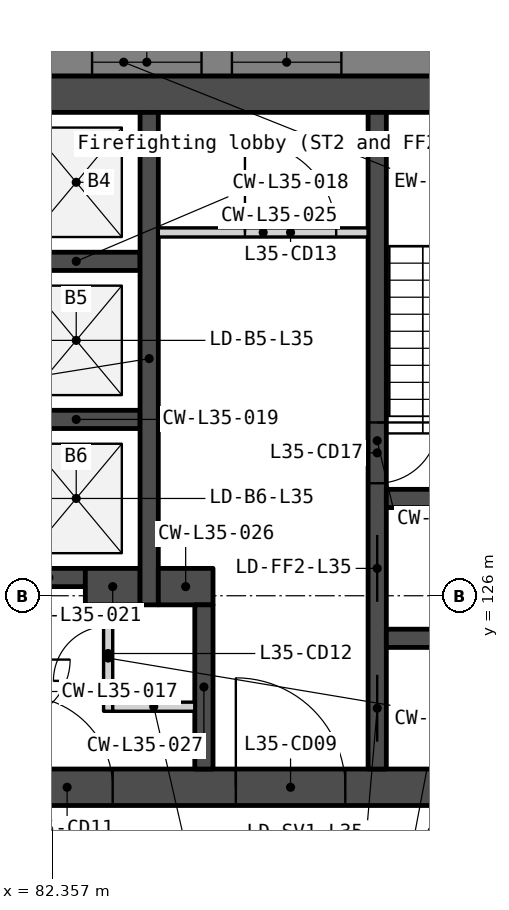
"""IFC4 building model, lengths in metres.
Left out: names, types, materials, properties, quantities, classifications, styles, units other than length and angle.
Written with IfcOpenShell. Run it as: python <this file> out.ifc"""

import sys

from ifc_helpers import new_model, si_unit, direction, frame, frame_2d, origin, place, context, subcontext, project, spatial, polyline, rectangle, outline, extrude, element, fill, save


model = new_model("IFC4")
c1 = context("Model", 3, precision=1e-05, world=origin(), true_north=direction((0.0, 1.0)))
c2 = subcontext(c1, "Body", "Model", "MODEL_VIEW")
j1 = project(units=[si_unit("LENGTHUNIT", "METRE"), si_unit("PLANEANGLEUNIT", "RADIAN")], contexts=[c1])
p1 = place(None, origin())
s1 = spatial("IfcSite", under=j1, at=p1, CompositionType="ELEMENT")
p2 = place(p1, origin())
s2 = spatial("IfcBuilding", under=s1, at=p2, CompositionType="ELEMENT")
p3 = place(p2, frame((0.0, 0.0, 140.3)))
s3 = spatial("IfcBuildingStorey", under=s2, at=p3, CompositionType="ELEMENT", Elevation=140.3)
p4 = place(p3, frame((69.0, 134.25, 0.0), z_axis=(0.0, 0.0, 1.0), x_axis=(1.0, 0.0, 0.0)))
e1 = element("IfcWall", 1, at=p4, inside=s3, PredefinedType="SOLIDWALL", context=c2, shape_type="SweptSolid", body=[
    extrude(rectangle(XDim=22.0, YDim=0.6, at=frame_2d((11.0, 0.0))), origin(), (0.0, 0.0, 1.0), 3.75),
])
p5 = place(p3, frame((69.0, 122.85, 0.0), z_axis=(0.0, 0.0, 1.0), x_axis=(1.0, 0.0, 0.0)))
e2 = element("IfcWall", 2, at=p5, inside=s3, PredefinedType="SOLIDWALL", context=c2, shape_type="SweptSolid", body=[
    extrude(rectangle(XDim=22.0, YDim=0.6, at=frame_2d((11.0, 0.0))), origin(), (0.0, 0.0, 1.0), 3.75),
])
p6 = place(p5, frame((16.375, 0.0, 0.0)))
e3 = element("IfcOpeningElement", 3, at=p6, cuts=e2, PredefinedType="OPENING", context=c2, shape_type="SweptSolid", body=[
    extrude(rectangle(XDim=1.8, YDim=2.1, at=frame_2d((0.9, 1.05))), frame((0.0, 0.31, 0.0), z_axis=(0.0, -1.0, 0.0), x_axis=(1.0, 0.0, 0.0)), (0.0, 0.0, 1.0), 0.62),
])
p7 = place(p5, frame((3.825, 0.0, 0.0)))
e4 = element("IfcOpeningElement", 4, at=p7, cuts=e2, PredefinedType="OPENING", context=c2, shape_type="SweptSolid", body=[
    extrude(rectangle(XDim=1.8, YDim=2.1, at=frame_2d((0.9, 1.05))), frame((0.0, 0.31, 0.0), z_axis=(0.0, -1.0, 0.0), x_axis=(1.0, 0.0, 0.0)), (0.0, 0.0, 1.0), 0.62),
])
p8 = place(p5, frame((12.85, 0.0, 0.0)))
e5 = element("IfcOpeningElement", 5, at=p8, cuts=e2, PredefinedType="OPENING", context=c2, shape_type="SweptSolid", body=[
    extrude(rectangle(XDim=1.5, YDim=2.1, at=frame_2d((0.75, 1.05))), frame((0.0, 0.31, 0.0), z_axis=(0.0, -1.0, 0.0), x_axis=(1.0, 0.0, 0.0)), (0.0, 0.0, 1.0), 0.62),
])
for number, where, z_axis, x_axis in (
    (6, (81.7, 131.5, 0.0), (0.0, 0.0, 1.0), (1.0, 0.0, 0.0)),
    (7, (81.7, 128.9, 0.0), (0.0, 0.0, 1.0), (1.0, 0.0, 0.0)),
):
    element("IfcWall", number, at=place(p3, frame(where, z_axis=z_axis, x_axis=x_axis)), inside=s3, PredefinedType="SOLIDWALL", context=c2, shape_type="SweptSolid", body=[
        extrude(rectangle(XDim=2.1, YDim=0.3, at=frame_2d((1.05, 0.0))), origin(), (0.0, 0.0, 1.0), 3.75),
    ])
p9 = place(p3, frame((81.7, 126.3, 0.0), z_axis=(0.0, 0.0, 1.0), x_axis=(1.0, 0.0, 0.0)))
e8 = element("IfcWall", 8, at=p9, inside=s3, PredefinedType="SOLIDWALL", context=c2, shape_type="SweptSolid", body=[
    extrude(rectangle(XDim=1.2, YDim=0.3, at=frame_2d((0.6, 0.0))), origin(), (0.0, 0.0, 1.0), 3.75),
])
p10 = place(p3, frame((82.9, 126.15, 0.0), z_axis=(0.0, 0.0, 1.0), x_axis=(1.0, 0.0, 0.0)))
e9 = element("IfcWall", 9, at=p10, inside=s3, PredefinedType="SOLIDWALL", context=c2, shape_type="SweptSolid", body=[
    extrude(rectangle(XDim=0.9, YDim=0.6, at=frame_2d((0.45, 0.0))), origin(), (0.0, 0.0, 1.0), 3.75),
])
p11 = place(p3, frame((83.275, 125.85, 0.0), z_axis=(0.0, 0.0, 1.0), x_axis=(0.0, -1.0, 0.0)))
e10 = element("IfcWall", 10, at=p11, inside=s3, PredefinedType="PARTITIONING", context=c2, shape_type="SweptSolid", body=[
    extrude(rectangle(XDim=1.75, YDim=0.15, at=frame_2d((0.875, 0.0))), origin(), (0.0, 0.0, 1.0), 3.75),
])
p12 = place(p11, frame((0.35, 0.0, 0.0)))
e11 = element("IfcOpeningElement", 11, at=p12, cuts=e10, PredefinedType="OPENING", context=c2, shape_type="SweptSolid", body=[
    extrude(rectangle(XDim=0.9, YDim=2.1, at=frame_2d((0.45, 1.05))), frame((0.0, 0.085, 0.0), z_axis=(0.0, -1.0, 0.0), x_axis=(1.0, 0.0, 0.0)), (0.0, 0.0, 1.0), 0.17),
])
p13 = place(p3, frame((83.35, 124.175, 0.0), z_axis=(0.0, 0.0, 1.0), x_axis=(1.0, 0.0, 0.0)))
e12 = element("IfcWall", 12, at=p13, inside=s3, PredefinedType="PARTITIONING", context=c2, shape_type="SweptSolid", body=[
    extrude(rectangle(XDim=1.35, YDim=0.15, at=frame_2d((0.675, 0.0))), origin(), (0.0, 0.0, 1.0), 3.75),
])
p14 = place(p3, frame((83.95, 133.95, 0.0), z_axis=(0.0, 0.0, 1.0), x_axis=(0.0, -1.0, 0.0)))
e13 = element("IfcWall", 13, at=p14, inside=s3, PredefinedType="SOLIDWALL", context=c2, shape_type="SweptSolid", body=[
    extrude(rectangle(XDim=8.1, YDim=0.3, at=frame_2d((4.05, 0.0))), origin(), (0.0, 0.0, 1.0), 3.75),
])
p15 = place(p3, frame((84.1, 131.975, 0.0), z_axis=(0.0, 0.0, 1.0), x_axis=(1.0, 0.0, 0.0)))
e14 = element("IfcWall", 14, at=p15, inside=s3, PredefinedType="PARTITIONING", context=c2, shape_type="SweptSolid", body=[
    extrude(rectangle(XDim=3.45, YDim=0.15, at=frame_2d((1.725, 0.0))), origin(), (0.0, 0.0, 1.0), 3.75),
])
p16 = place(p15, frame((1.425, 0.0, 0.0)))
e15 = element("IfcOpeningElement", 15, at=p16, cuts=e14, PredefinedType="OPENING", context=c2, shape_type="SweptSolid", body=[
    extrude(rectangle(XDim=1.5, YDim=2.1, at=frame_2d((0.75, 1.05))), frame((0.0, 0.085, 0.0), z_axis=(0.0, -1.0, 0.0), x_axis=(1.0, 0.0, 0.0)), (0.0, 0.0, 1.0), 0.17),
])
p17 = place(p3, frame((84.1, 126.15, 0.0), z_axis=(0.0, 0.0, 1.0), x_axis=(1.0, 0.0, 0.0)))
e16 = element("IfcWall", 16, at=p17, inside=s3, PredefinedType="SOLIDWALL", context=c2, shape_type="SweptSolid", body=[
    extrude(rectangle(XDim=0.9, YDim=0.6, at=frame_2d((0.45, 0.0))), origin(), (0.0, 0.0, 1.0), 3.75),
])
p18 = place(p3, frame((84.85, 125.85, 0.0), z_axis=(0.0, 0.0, 1.0), x_axis=(0.0, -1.0, 0.0)))
e17 = element("IfcWall", 17, at=p18, inside=s3, PredefinedType="SOLIDWALL", context=c2, shape_type="SweptSolid", body=[
    extrude(rectangle(XDim=2.7, YDim=0.3, at=frame_2d((1.35, 0.0))), origin(), (0.0, 0.0, 1.0), 3.75),
])
p19 = place(p3, frame((87.7, 133.95, 0.0), z_axis=(0.0, 0.0, 1.0), x_axis=(0.0, -1.0, 0.0)))
e18 = element("IfcWall", 18, at=p19, inside=s3, PredefinedType="SOLIDWALL", context=c2, shape_type="SweptSolid", body=[
    extrude(rectangle(XDim=10.8, YDim=0.3, at=frame_2d((5.4, 0.0))), origin(), (0.0, 0.0, 1.0), 3.75),
])
p20 = place(p19, frame((6.95, 0.0, 0.0)))
e19 = element("IfcOpeningElement", 19, at=p20, cuts=e18, PredefinedType="OPENING", context=c2, shape_type="SweptSolid", body=[
    extrude(rectangle(XDim=1.1, YDim=2.1, at=frame_2d((0.55, 1.05))), frame((0.0, 0.16, 0.0), z_axis=(0.0, -1.0, 0.0), x_axis=(1.0, 0.0, 0.0)), (0.0, 0.0, 1.0), 0.32),
])
p21 = place(p19, frame((5.1, 0.0, 0.0)))
e20 = element("IfcOpeningElement", 20, at=p21, cuts=e18, PredefinedType="OPENING", context=c2, shape_type="SweptSolid", body=[
    extrude(rectangle(XDim=1.0, YDim=2.1, at=frame_2d((0.5, 1.05))), frame((0.0, 0.16, 0.0), z_axis=(0.0, -1.0, 0.0), x_axis=(1.0, 0.0, 0.0)), (0.0, 0.0, 1.0), 0.32),
])
p22 = place(p19, frame((9.25, 0.0, 0.0)))
e21 = element("IfcOpeningElement", 21, at=p22, cuts=e18, PredefinedType="OPENING", context=c2, shape_type="SweptSolid", body=[
    extrude(rectangle(XDim=1.1, YDim=2.1, at=frame_2d((0.55, 1.05))), frame((0.0, 0.16, 0.0), z_axis=(0.0, -1.0, 0.0), x_axis=(1.0, 0.0, 0.0)), (0.0, 0.0, 1.0), 0.32),
])
for number, where, z_axis, x_axis in (
    (22, (87.85, 127.6, 0.0), (0.0, 0.0, 1.0), (1.0, 0.0, 0.0)),
    (23, (87.85, 125.3, 0.0), (0.0, 0.0, 1.0), (1.0, 0.0, 0.0)),
):
    element("IfcWall", number, at=place(p3, frame(where, z_axis=z_axis, x_axis=x_axis)), inside=s3, PredefinedType="SOLIDWALL", context=c2, shape_type="SweptSolid", body=[
        extrude(rectangle(XDim=2.55, YDim=0.3, at=frame_2d((1.275, 0.0))), origin(), (0.0, 0.0, 1.0), 3.75),
    ])
p23 = place(p3, frame((100.243, 134.775, -0.15), z_axis=(0.0, 0.0, 1.0), x_axis=(-1.0, 0.0, 0.0)))
e24 = element("IfcWall", 24, at=p23, inside=s3, PredefinedType="SOLIDWALL", context=c2, shape_type="SweptSolid", body=[
    extrude(outline(polyline([(0.0, 0.0), (0.0, 3.9), (33.425, 3.9), (33.425, 0.0), (0.0, 0.0)])), frame((0.0, 0.225, 0.0), z_axis=(0.0, -1.0, 0.0), x_axis=(1.0, 0.0, 0.0)), (0.0, 0.0, 1.0), 0.45),
])
p24 = place(p23, frame((3.011, 0.0, 0.95)))
e25 = element("IfcOpeningElement", 25, at=p24, cuts=e24, PredefinedType="OPENING", context=c2, shape_type="SweptSolid", body=[
    extrude(rectangle(XDim=1.8, YDim=2.2, at=frame_2d((0.9, 1.1))), frame((0.0, 0.235, 0.0), z_axis=(0.0, -1.0, 0.0), x_axis=(1.0, 0.0, 0.0)), (0.0, 0.0, 1.0), 0.47),
])
p25 = place(p23, frame((5.311, 0.0, 0.95)))
e26 = element("IfcOpeningElement", 26, at=p25, cuts=e24, PredefinedType="OPENING", context=c2, shape_type="SweptSolid", body=[
    extrude(rectangle(XDim=1.8, YDim=2.2, at=frame_2d((0.9, 1.1))), frame((0.0, 0.235, 0.0), z_axis=(0.0, -1.0, 0.0), x_axis=(1.0, 0.0, 0.0)), (0.0, 0.0, 1.0), 0.47),
])
p26 = place(p23, frame((13.132, 0.0, 0.95)))
e27 = element("IfcOpeningElement", 27, at=p26, cuts=e24, PredefinedType="OPENING", context=c2, shape_type="SweptSolid", body=[
    extrude(rectangle(XDim=1.8, YDim=2.2, at=frame_2d((0.9, 1.1))), frame((0.0, 0.235, 0.0), z_axis=(0.0, -1.0, 0.0), x_axis=(1.0, 0.0, 0.0)), (0.0, 0.0, 1.0), 0.47),
])
p27 = place(p23, frame((15.432, 0.0, 0.95)))
e28 = element("IfcOpeningElement", 28, at=p27, cuts=e24, PredefinedType="OPENING", context=c2, shape_type="SweptSolid", body=[
    extrude(rectangle(XDim=1.8, YDim=2.2, at=frame_2d((0.9, 1.1))), frame((0.0, 0.235, 0.0), z_axis=(0.0, -1.0, 0.0), x_axis=(1.0, 0.0, 0.0)), (0.0, 0.0, 1.0), 0.47),
])
p28 = place(p23, frame((23.254, 0.0, 0.95)))
e29 = element("IfcOpeningElement", 29, at=p28, cuts=e24, PredefinedType="OPENING", context=c2, shape_type="SweptSolid", body=[
    extrude(rectangle(XDim=1.8, YDim=2.2, at=frame_2d((0.9, 1.1))), frame((0.0, 0.235, 0.0), z_axis=(0.0, -1.0, 0.0), x_axis=(1.0, 0.0, 0.0)), (0.0, 0.0, 1.0), 0.47),
])
p29 = place(p23, frame((25.554, 0.0, 0.95)))
e30 = element("IfcOpeningElement", 30, at=p29, cuts=e24, PredefinedType="OPENING", context=c2, shape_type="SweptSolid", body=[
    extrude(rectangle(XDim=1.8, YDim=2.2, at=frame_2d((0.9, 1.1))), frame((0.0, 0.235, 0.0), z_axis=(0.0, -1.0, 0.0), x_axis=(1.0, 0.0, 0.0)), (0.0, 0.0, 1.0), 0.47),
])
p30 = place(p3, frame((82.105, 96.067, -0.15), z_axis=(0.0, 0.0, 1.0), x_axis=(0.499997369791, 0.866026922331, 0.0)))
e31 = element("IfcWall", 31, at=p30, inside=s3, PredefinedType="SOLIDWALL", context=c2, shape_type="SweptSolid", body=[
    extrude(outline(polyline([(40.486, 0.0), (40.486, 3.9), (0.0, 3.9), (0.0, 0.0), (40.486, 0.0)])), frame((0.0, 0.225, 0.0), z_axis=(0.0, -1.0, 0.0), x_axis=(1.0, 0.0, 0.0)), (0.0, 0.0, 1.0), 0.45),
])
p31 = place(p30, frame((3.011, 0.0, 0.95)))
e32 = element("IfcOpeningElement", 32, at=p31, cuts=e31, PredefinedType="OPENING", context=c2, shape_type="SweptSolid", body=[
    extrude(rectangle(XDim=1.8, YDim=2.2, at=frame_2d((0.9, 1.1))), frame((0.0, 0.235, 0.0), z_axis=(0.0, -1.0, 0.0), x_axis=(1.0, 0.0, 0.0)), (0.0, 0.0, 1.0), 0.47),
])
p32 = place(p30, frame((5.311, 0.0, 0.95)))
e33 = element("IfcOpeningElement", 33, at=p32, cuts=e31, PredefinedType="OPENING", context=c2, shape_type="SweptSolid", body=[
    extrude(rectangle(XDim=1.8, YDim=2.2, at=frame_2d((0.9, 1.1))), frame((0.0, 0.235, 0.0), z_axis=(0.0, -1.0, 0.0), x_axis=(1.0, 0.0, 0.0)), (0.0, 0.0, 1.0), 0.47),
])
p33 = place(p30, frame((13.132, 0.0, 0.95)))
e34 = element("IfcOpeningElement", 34, at=p33, cuts=e31, PredefinedType="OPENING", context=c2, shape_type="SweptSolid", body=[
    extrude(rectangle(XDim=1.8, YDim=2.2, at=frame_2d((0.9, 1.1))), frame((0.0, 0.235, 0.0), z_axis=(0.0, -1.0, 0.0), x_axis=(1.0, 0.0, 0.0)), (0.0, 0.0, 1.0), 0.47),
])
p34 = place(p30, frame((15.432, 0.0, 0.95)))
e35 = element("IfcOpeningElement", 35, at=p34, cuts=e31, PredefinedType="OPENING", context=c2, shape_type="SweptSolid", body=[
    extrude(rectangle(XDim=1.8, YDim=2.2, at=frame_2d((0.9, 1.1))), frame((0.0, 0.235, 0.0), z_axis=(0.0, -1.0, 0.0), x_axis=(1.0, 0.0, 0.0)), (0.0, 0.0, 1.0), 0.47),
])
p35 = place(p30, frame((23.254, 0.0, 0.95)))
e36 = element("IfcOpeningElement", 36, at=p35, cuts=e31, PredefinedType="OPENING", context=c2, shape_type="SweptSolid", body=[
    extrude(rectangle(XDim=1.8, YDim=2.2, at=frame_2d((0.9, 1.1))), frame((0.0, 0.235, 0.0), z_axis=(0.0, -1.0, 0.0), x_axis=(1.0, 0.0, 0.0)), (0.0, 0.0, 1.0), 0.47),
])
p36 = place(p30, frame((25.554, 0.0, 0.95)))
e37 = element("IfcOpeningElement", 37, at=p36, cuts=e31, PredefinedType="OPENING", context=c2, shape_type="SweptSolid", body=[
    extrude(rectangle(XDim=1.8, YDim=2.2, at=frame_2d((0.9, 1.1))), frame((0.0, 0.235, 0.0), z_axis=(0.0, -1.0, 0.0), x_axis=(1.0, 0.0, 0.0)), (0.0, 0.0, 1.0), 0.47),
])
p37 = place(p30, frame((33.375, 0.0, 0.95)))
e38 = element("IfcOpeningElement", 38, at=p37, cuts=e31, PredefinedType="OPENING", context=c2, shape_type="SweptSolid", body=[
    extrude(rectangle(XDim=1.8, YDim=2.2, at=frame_2d((0.9, 1.1))), frame((0.0, 0.235, 0.0), z_axis=(0.0, -1.0, 0.0), x_axis=(1.0, 0.0, 0.0)), (0.0, 0.0, 1.0), 0.47),
])
p38 = place(p30, frame((35.675, 0.0, 0.95)))
e39 = element("IfcOpeningElement", 39, at=p38, cuts=e31, PredefinedType="OPENING", context=c2, shape_type="SweptSolid", body=[
    extrude(rectangle(XDim=1.8, YDim=2.2, at=frame_2d((0.9, 1.1))), frame((0.0, 0.235, 0.0), z_axis=(0.0, -1.0, 0.0), x_axis=(1.0, 0.0, 0.0)), (0.0, 0.0, 1.0), 0.47),
])
p39 = place(p3, frame((87.465, 120.1, 0.0), z_axis=(0.0, 0.0, 1.0), x_axis=(0.499991416419, 0.86603035946, 0.0)))
e40 = element("IfcWall", 40, at=p39, inside=s3, PredefinedType="PARTITIONING", context=c2, shape_type="SweptSolid", body=[
    extrude(rectangle(XDim=2.829, YDim=0.15, at=frame_2d((1.414, 0.0))), origin(), (0.0, 0.0, 1.0), 3.75),
])
p40 = place(p39, frame((0.914, 0.0, 0.0)))
e41 = element("IfcOpeningElement", 41, at=p40, cuts=e40, PredefinedType="OPENING", context=c2, shape_type="SweptSolid", body=[
    extrude(rectangle(XDim=1.0, YDim=2.1, at=frame_2d((0.5, 1.05))), frame((0.0, 0.085, 0.0), z_axis=(0.0, -1.0, 0.0), x_axis=(1.0, 0.0, 0.0)), (0.0, 0.0, 1.0), 0.17),
])
p41 = place(p20, origin())
e42 = element("IfcDoor", 42, at=p41, inside=s3, OperationType="SLIDING_TO_LEFT", PredefinedType="DOOR", context=c2, shape_type="SweptSolid", body=[
    extrude(rectangle(XDim=1.1, YDim=2.1, at=frame_2d((0.55, 1.05))), frame((0.0, 0.025, 0.0), z_axis=(0.0, -1.0, 0.0), x_axis=(1.0, 0.0, 0.0)), (0.0, 0.0, 1.0), 0.05),
])
fill(e19, e42)
p42 = place(p6, origin())
e43 = element("IfcDoor", 43, at=p42, inside=s3, OperationType="DOUBLE_DOOR_DOUBLE_SWING", PredefinedType="DOOR", context=c2, shape_type="SweptSolid", body=[
    extrude(rectangle(XDim=1.8, YDim=2.1, at=frame_2d((0.9, 1.05))), frame((0.0, 0.025, 0.0), z_axis=(0.0, -1.0, 0.0), x_axis=(1.0, 0.0, 0.0)), (0.0, 0.0, 1.0), 0.05),
])
fill(e3, e43)
p43 = place(p8, origin())
e44 = element("IfcDoor", 44, at=p43, inside=s3, OperationType="DOUBLE_DOOR_DOUBLE_SWING", PredefinedType="DOOR", context=c2, shape_type="SweptSolid", body=[
    extrude(rectangle(XDim=1.5, YDim=2.1, at=frame_2d((0.75, 1.05))), frame((0.0, 0.025, 0.0), z_axis=(0.0, -1.0, 0.0), x_axis=(1.0, 0.0, 0.0)), (0.0, 0.0, 1.0), 0.05),
])
fill(e5, e44)
p44 = place(p12, origin())
e45 = element("IfcDoor", 45, at=p44, inside=s3, OperationType="SINGLE_SWING_RIGHT", PredefinedType="DOOR", context=c2, shape_type="SweptSolid", body=[
    extrude(rectangle(XDim=0.9, YDim=2.1, at=frame_2d((0.45, 1.05))), frame((0.0, 0.025, 0.0), z_axis=(0.0, -1.0, 0.0), x_axis=(1.0, 0.0, 0.0)), (0.0, 0.0, 1.0), 0.05),
])
fill(e11, e45)
p45 = place(p16, origin())
e46 = element("IfcDoor", 46, at=p45, inside=s3, OperationType="DOUBLE_DOOR_DOUBLE_SWING", PredefinedType="DOOR", context=c2, shape_type="SweptSolid", body=[
    extrude(rectangle(XDim=1.5, YDim=2.1, at=frame_2d((0.75, 1.05))), frame((0.0, 0.025, 0.0), z_axis=(0.0, -1.0, 0.0), x_axis=(1.0, 0.0, 0.0)), (0.0, 0.0, 1.0), 0.05),
])
fill(e15, e46)
p46 = place(p21, origin())
e47 = element("IfcDoor", 47, at=p46, inside=s3, OperationType="SINGLE_SWING_LEFT", PredefinedType="DOOR", context=c2, shape_type="SweptSolid", body=[
    extrude(rectangle(XDim=1.0, YDim=2.1, at=frame_2d((0.5, 1.05))), frame((0.0, 0.025, 0.0), z_axis=(0.0, -1.0, 0.0), x_axis=(1.0, 0.0, 0.0)), (0.0, 0.0, 1.0), 0.05),
])
fill(e20, e47)
p47 = place(p22, origin())
e48 = element("IfcDoor", 48, at=p47, inside=s3, OperationType="SLIDING_TO_LEFT", PredefinedType="DOOR", context=c2, shape_type="SweptSolid", body=[
    extrude(rectangle(XDim=1.1, YDim=2.1, at=frame_2d((0.55, 1.05))), frame((0.0, 0.025, 0.0), z_axis=(0.0, -1.0, 0.0), x_axis=(1.0, 0.0, 0.0)), (0.0, 0.0, 1.0), 0.05),
])
fill(e21, e48)
p48 = place(p26, origin())
e49 = element("IfcWindow", 49, at=p48, inside=s3, PartitioningType="SINGLE_PANEL", PredefinedType="WINDOW", context=c2, shape_type="SweptSolid", body=[
    extrude(rectangle(XDim=1.8, YDim=2.2, at=frame_2d((0.9, 1.1))), frame((0.0, 0.03, 0.0), z_axis=(0.0, -1.0, 0.0), x_axis=(1.0, 0.0, 0.0)), (0.0, 0.0, 1.0), 0.06),
])
fill(e27, e49)
p49 = place(p27, origin())
e50 = element("IfcWindow", 50, at=p49, inside=s3, PartitioningType="SINGLE_PANEL", PredefinedType="WINDOW", context=c2, shape_type="SweptSolid", body=[
    extrude(rectangle(XDim=1.8, YDim=2.2, at=frame_2d((0.9, 1.1))), frame((0.0, 0.03, 0.0), z_axis=(0.0, -1.0, 0.0), x_axis=(1.0, 0.0, 0.0)), (0.0, 0.0, 1.0), 0.06),
])
fill(e28, e50)
save(model, sys.argv[1])
